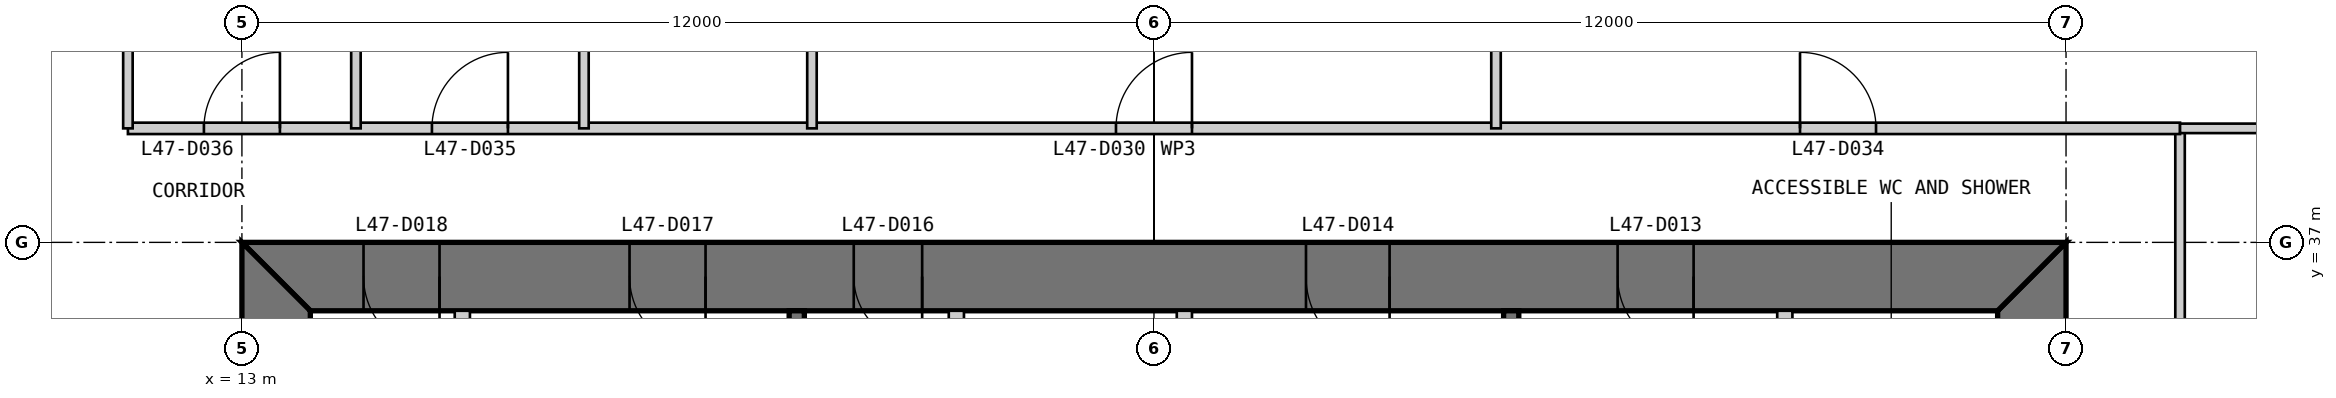
"""IFC4 building model, lengths in metres.
Left out: names, types, materials, properties, quantities, classifications, styles, units other than length and angle.
Written with IfcOpenShell. Run it as: python <this file> out.ifc"""

import sys

from ifc_helpers import new_model, si_unit, direction, frame, frame_2d, origin, place, context, subcontext, project, spatial, polyline, rectangle, outline, extrude, element, fill, save


model = new_model("IFC4")
c1 = context("Model", 3, precision=1e-05, world=origin(), true_north=direction((0.0, 1.0)))
c2 = subcontext(c1, "Body", "Model", "MODEL_VIEW")
j1 = project(units=[si_unit("LENGTHUNIT", "METRE"), si_unit("PLANEANGLEUNIT", "RADIAN")], contexts=[c1])
p1 = place(None, origin())
s1 = spatial("IfcSite", under=j1, at=p1, CompositionType="ELEMENT")
p2 = place(p1, origin())
s2 = spatial("IfcBuilding", under=s1, at=p2, CompositionType="ELEMENT")
p3 = place(p2, frame((0.0, 0.0, 201.8)))
s3 = spatial("IfcBuildingStorey", under=s2, at=p3, CompositionType="ELEMENT", Elevation=201.8)
p4 = place(p3, frame((36.55, 13.9, 0.0), z_axis=(0.0, 0.0, 1.0), x_axis=(0.0, 1.0, 0.0)))
e1 = element("IfcWall", 1, at=p4, inside=s3, PredefinedType="SHEAR", context=c2, shape_type="SweptSolid", body=[
    extrude(outline(polyline([(-0.9, -0.45), (23.1, -0.45), (22.2, 0.45), (0.0, 0.45), (-0.9, -0.45)])), origin(), (0.0, 0.0, 1.0), 4.0),
])
p5 = place(p4, frame((20.2, 0.0, 0.0)))
e2 = element("IfcOpeningElement", 2, at=p5, cuts=e1, PredefinedType="OPENING", context=c2, shape_type="SweptSolid", body=[
    extrude(rectangle(XDim=1.0, YDim=2.2, at=frame_2d((0.5, 1.1))), frame((0.0, 0.46, 0.0), z_axis=(0.0, -1.0, 0.0), x_axis=(1.0, 0.0, 0.0)), (0.0, 0.0, 1.0), 0.92),
])
p6 = place(p4, frame((17.25, 0.0, 0.0)))
e3 = element("IfcOpeningElement", 3, at=p6, cuts=e1, PredefinedType="OPENING", context=c2, shape_type="SweptSolid", body=[
    extrude(rectangle(XDim=0.9, YDim=2.2, at=frame_2d((0.45, 1.1))), frame((0.0, 0.46, 0.0), z_axis=(0.0, -1.0, 0.0), x_axis=(1.0, 0.0, 0.0)), (0.0, 0.0, 1.0), 0.92),
])
p7 = place(p3, frame((37.0, 36.55, 0.0), z_axis=(0.0, 0.0, 1.0), x_axis=(-1.0, 0.0, 0.0)))
e4 = element("IfcWall", 4, at=p7, inside=s3, PredefinedType="SHEAR", context=c2, shape_type="SweptSolid", body=[
    extrude(outline(polyline([(0.0, -0.45), (24.0, -0.45), (23.1, 0.45), (0.9, 0.45), (0.0, -0.45)])), origin(), (0.0, 0.0, 1.0), 4.0),
])
p8 = place(p7, frame((4.9, 0.0, 0.0)))
e5 = element("IfcOpeningElement", 5, at=p8, cuts=e4, PredefinedType="OPENING", context=c2, shape_type="SweptSolid", body=[
    extrude(rectangle(XDim=1.0, YDim=2.2, at=frame_2d((0.5, 1.1))), frame((0.0, 0.46, 0.0), z_axis=(0.0, -1.0, 0.0), x_axis=(1.0, 0.0, 0.0)), (0.0, 0.0, 1.0), 0.92),
])
p9 = place(p7, frame((8.9, 0.0, 0.0)))
e6 = element("IfcOpeningElement", 6, at=p9, cuts=e4, PredefinedType="OPENING", context=c2, shape_type="SweptSolid", body=[
    extrude(rectangle(XDim=1.1, YDim=2.2, at=frame_2d((0.55, 1.1))), frame((0.0, 0.46, 0.0), z_axis=(0.0, -1.0, 0.0), x_axis=(1.0, 0.0, 0.0)), (0.0, 0.0, 1.0), 0.92),
])
p10 = place(p7, frame((15.05, 0.0, 0.0)))
e7 = element("IfcOpeningElement", 7, at=p10, cuts=e4, PredefinedType="OPENING", context=c2, shape_type="SweptSolid", body=[
    extrude(rectangle(XDim=0.9, YDim=2.2, at=frame_2d((0.45, 1.1))), frame((0.0, 0.46, 0.0), z_axis=(0.0, -1.0, 0.0), x_axis=(1.0, 0.0, 0.0)), (0.0, 0.0, 1.0), 0.92),
])
p11 = place(p7, frame((17.9, 0.0, 0.0)))
e8 = element("IfcOpeningElement", 8, at=p11, cuts=e4, PredefinedType="OPENING", context=c2, shape_type="SweptSolid", body=[
    extrude(rectangle(XDim=1.0, YDim=2.2, at=frame_2d((0.5, 1.1))), frame((0.0, 0.46, 0.0), z_axis=(0.0, -1.0, 0.0), x_axis=(1.0, 0.0, 0.0)), (0.0, 0.0, 1.0), 0.92),
])
p12 = place(p7, frame((21.4, 0.0, 0.0)))
e9 = element("IfcOpeningElement", 9, at=p12, cuts=e4, PredefinedType="OPENING", context=c2, shape_type="SweptSolid", body=[
    extrude(rectangle(XDim=1.0, YDim=2.2, at=frame_2d((0.5, 1.1))), frame((0.0, 0.46, 0.0), z_axis=(0.0, -1.0, 0.0), x_axis=(1.0, 0.0, 0.0)), (0.0, 0.0, 1.0), 0.92),
])
p13 = place(p3, frame((13.45, 36.1, 0.0), z_axis=(0.0, 0.0, 1.0), x_axis=(0.0, -1.0, 0.0)))
e10 = element("IfcWall", 10, at=p13, inside=s3, PredefinedType="SHEAR", context=c2, shape_type="SweptSolid", body=[
    extrude(outline(polyline([(-0.9, -0.45), (23.1, -0.45), (22.2, 0.45), (0.0, 0.45), (-0.9, -0.45)])), origin(), (0.0, 0.0, 1.0), 4.0),
])
p14 = place(p13, frame((20.2, 0.0, 0.0)))
e11 = element("IfcOpeningElement", 11, at=p14, cuts=e10, PredefinedType="OPENING", context=c2, shape_type="SweptSolid", body=[
    extrude(rectangle(XDim=1.0, YDim=2.2, at=frame_2d((0.5, 1.1))), frame((0.0, 0.46, 0.0), z_axis=(0.0, -1.0, 0.0), x_axis=(1.0, 0.0, 0.0)), (0.0, 0.0, 1.0), 0.92),
])
p15 = place(p13, frame((17.25, 0.0, 0.0)))
e12 = element("IfcOpeningElement", 12, at=p15, cuts=e10, PredefinedType="OPENING", context=c2, shape_type="SweptSolid", body=[
    extrude(rectangle(XDim=0.9, YDim=2.2, at=frame_2d((0.45, 1.1))), frame((0.0, 0.46, 0.0), z_axis=(0.0, -1.0, 0.0), x_axis=(1.0, 0.0, 0.0)), (0.0, 0.0, 1.0), 0.92),
])
p16 = place(p3, frame((33.3, 36.1, 0.0), z_axis=(0.0, 0.0, 1.0), x_axis=(0.0, -1.0, 0.0)))
e13 = element("IfcWall", 13, at=p16, inside=s3, PredefinedType="PARTITIONING", context=c2, shape_type="SweptSolid", body=[
    extrude(rectangle(XDim=16.1, YDim=0.2, at=frame_2d((8.05, 0.0))), origin(), (0.0, 0.0, 1.0), 3.8),
])
p17 = place(p3, frame((29.7, 36.1, 0.0), z_axis=(0.0, 0.0, 1.0), x_axis=(0.0, -1.0, 0.0)))
e14 = element("IfcWall", 14, at=p17, inside=s3, PredefinedType="SOLIDWALL", context=c2, shape_type="SweptSolid", body=[
    extrude(rectangle(XDim=16.1, YDim=0.2, at=frame_2d((8.05, 0.0))), origin(), (0.0, 0.0, 1.0), 3.8),
])
p18 = place(p17, frame((7.217, 0.0, 0.0)))
e15 = element("IfcOpeningElement", 15, at=p18, cuts=e14, PredefinedType="OPENING", context=c2, shape_type="SweptSolid", body=[
    extrude(rectangle(XDim=1.1, YDim=2.2, at=frame_2d((0.55, 1.1))), frame((0.0, 0.11, 0.0), z_axis=(0.0, -1.0, 0.0), x_axis=(1.0, 0.0, 0.0)), (0.0, 0.0, 1.0), 0.22),
])
p19 = place(p17, frame((10.55, 0.0, 0.0)))
e16 = element("IfcOpeningElement", 16, at=p19, cuts=e14, PredefinedType="OPENING", context=c2, shape_type="SweptSolid", body=[
    extrude(rectangle(XDim=1.1, YDim=2.2, at=frame_2d((0.55, 1.1))), frame((0.0, 0.11, 0.0), z_axis=(0.0, -1.0, 0.0), x_axis=(1.0, 0.0, 0.0)), (0.0, 0.0, 1.0), 0.22),
])
p20 = place(p17, frame((13.883, 0.0, 0.0)))
e17 = element("IfcOpeningElement", 17, at=p20, cuts=e14, PredefinedType="OPENING", context=c2, shape_type="SweptSolid", body=[
    extrude(rectangle(XDim=1.1, YDim=2.2, at=frame_2d((0.55, 1.1))), frame((0.0, 0.11, 0.0), z_axis=(0.0, -1.0, 0.0), x_axis=(1.0, 0.0, 0.0)), (0.0, 0.0, 1.0), 0.22),
])
p21 = place(p3, frame((25.4, 36.1, 0.0), z_axis=(0.0, 0.0, 1.0), x_axis=(0.0, -1.0, 0.0)))
e18 = element("IfcWall", 18, at=p21, inside=s3, PredefinedType="PARTITIONING", context=c2, shape_type="SweptSolid", body=[
    extrude(rectangle(XDim=3.3, YDim=0.2, at=frame_2d((1.65, 0.0))), origin(), (0.0, 0.0, 1.0), 3.8),
])
p22 = place(p21, frame((0.9, 0.0, 0.0)))
e19 = element("IfcOpeningElement", 19, at=p22, cuts=e18, PredefinedType="OPENING", context=c2, shape_type="SweptSolid", body=[
    extrude(rectangle(XDim=1.1, YDim=2.2, at=frame_2d((0.55, 1.1))), frame((0.0, 0.11, 0.0), z_axis=(0.0, -1.0, 0.0), x_axis=(1.0, 0.0, 0.0)), (0.0, 0.0, 1.0), 0.22),
])
p23 = place(p3, frame((22.4, 36.1, 0.0), z_axis=(0.0, 0.0, 1.0), x_axis=(0.0, -1.0, 0.0)))
e20 = element("IfcWall", 20, at=p23, inside=s3, PredefinedType="PARTITIONING", context=c2, shape_type="SweptSolid", body=[
    extrude(rectangle(XDim=3.3, YDim=0.2, at=frame_2d((1.65, 0.0))), origin(), (0.0, 0.0, 1.0), 3.8),
])
p24 = place(p3, frame((20.3, 36.1, 0.0), z_axis=(0.0, 0.0, 1.0), x_axis=(0.0, -1.0, 0.0)))
e21 = element("IfcWall", 21, at=p24, inside=s3, PredefinedType="SOLIDWALL", context=c2, shape_type="SweptSolid", body=[
    extrude(rectangle(XDim=6.1, YDim=0.2, at=frame_2d((3.05, 0.0))), origin(), (0.0, 0.0, 1.0), 3.8),
])
p25 = place(p3, frame((15.9, 36.1, 0.0), z_axis=(0.0, 0.0, 1.0), x_axis=(0.0, -1.0, 0.0)))
e22 = element("IfcWall", 22, at=p25, inside=s3, PredefinedType="PARTITIONING", context=c2, shape_type="SweptSolid", body=[
    extrude(rectangle(XDim=6.1, YDim=0.2, at=frame_2d((3.05, 0.0))), origin(), (0.0, 0.0, 1.0), 3.8),
])
p26 = place(p3, frame((38.5, 35.5, 0.0), z_axis=(0.0, 0.0, 1.0), x_axis=(0.0, 1.0, 0.0)))
e23 = element("IfcWall", 23, at=p26, inside=s3, PredefinedType="PARTITIONING", context=c2, shape_type="SweptSolid", body=[
    extrude(rectangle(XDim=3.0, YDim=0.125, at=frame_2d((1.5, 0.0))), origin(), (0.0, 0.0, 1.0), 3.85),
])
p27 = place(p3, frame((38.5, 38.5, 0.0), z_axis=(0.0, 0.0, 1.0), x_axis=(-1.0, 0.0, 0.0)))
e24 = element("IfcWall", 24, at=p27, inside=s3, PredefinedType="PARTITIONING", context=c2, shape_type="SweptSolid", body=[
    extrude(rectangle(XDim=27.0, YDim=0.15, at=frame_2d((13.5, 0.0))), origin(), (0.0, 0.0, 1.0), 3.85),
])
p28 = place(p27, frame((13.0, 0.0, 0.0)))
e25 = element("IfcOpeningElement", 25, at=p28, cuts=e24, PredefinedType="OPENING", context=c2, shape_type="SweptSolid", body=[
    extrude(rectangle(XDim=1.0, YDim=2.2, at=frame_2d((0.5, 1.1))), frame((0.0, 0.085, 0.0), z_axis=(0.0, -1.0, 0.0), x_axis=(1.0, 0.0, 0.0)), (0.0, 0.0, 1.0), 0.17),
])
p29 = place(p27, frame((4.0, 0.0, 0.0)))
e26 = element("IfcOpeningElement", 26, at=p29, cuts=e24, PredefinedType="OPENING", context=c2, shape_type="SweptSolid", body=[
    extrude(rectangle(XDim=1.0, YDim=2.2, at=frame_2d((0.5, 1.1))), frame((0.0, 0.085, 0.0), z_axis=(0.0, -1.0, 0.0), x_axis=(1.0, 0.0, 0.0)), (0.0, 0.0, 1.0), 0.17),
])
p30 = place(p27, frame((22.0, 0.0, 0.0)))
e27 = element("IfcOpeningElement", 27, at=p30, cuts=e24, PredefinedType="OPENING", context=c2, shape_type="SweptSolid", body=[
    extrude(rectangle(XDim=1.0, YDim=2.2, at=frame_2d((0.5, 1.1))), frame((0.0, 0.085, 0.0), z_axis=(0.0, -1.0, 0.0), x_axis=(1.0, 0.0, 0.0)), (0.0, 0.0, 1.0), 0.17),
])
p31 = place(p27, frame((25.0, 0.0, 0.0)))
e28 = element("IfcOpeningElement", 28, at=p31, cuts=e24, PredefinedType="OPENING", context=c2, shape_type="SweptSolid", body=[
    extrude(rectangle(XDim=1.0, YDim=2.2, at=frame_2d((0.5, 1.1))), frame((0.0, 0.085, 0.0), z_axis=(0.0, -1.0, 0.0), x_axis=(1.0, 0.0, 0.0)), (0.0, 0.0, 1.0), 0.17),
])
for number, where, z_axis, x_axis in (
    (29, (49.85, 38.5, 0.0), (0.0, 0.0, 1.0), (-1.0, 0.0, 0.0)),
    (30, (29.5, 49.85, 0.0), (0.0, 0.0, 1.0), (0.0, -1.0, 0.0)),
):
    element("IfcWall", number, at=place(p3, frame(where, z_axis=z_axis, x_axis=x_axis)), inside=s3, PredefinedType="PARTITIONING", context=c2, shape_type="SweptSolid", body=[
        extrude(rectangle(XDim=11.35, YDim=0.125, at=frame_2d((5.675, 0.0))), origin(), (0.0, 0.0, 1.0), 3.85),
    ])
p32 = place(p3, frame((20.5, 46.0, 0.0), z_axis=(0.0, 0.0, 1.0), x_axis=(0.0, -1.0, 0.0)))
e31 = element("IfcWall", 31, at=p32, inside=s3, PredefinedType="PARTITIONING", context=c2, shape_type="SweptSolid", body=[
    extrude(rectangle(XDim=7.5, YDim=0.125, at=frame_2d((3.75, 0.0))), origin(), (0.0, 0.0, 1.0), 3.85),
])
p33 = place(p32, frame((3.3, 0.0, 0.0)))
e32 = element("IfcOpeningElement", 32, at=p33, cuts=e31, PredefinedType="OPENING", context=c2, shape_type="SweptSolid", body=[
    extrude(rectangle(XDim=0.9, YDim=2.2, at=frame_2d((0.45, 1.1))), frame((0.0, 0.073, 0.0), z_axis=(0.0, -1.0, 0.0), x_axis=(1.0, 0.0, 0.0)), (0.0, 0.0, 1.0), 0.145),
])
p34 = place(p3, frame((17.5, 49.85, 0.0), z_axis=(0.0, 0.0, 1.0), x_axis=(0.0, -1.0, 0.0)))
e33 = element("IfcWall", 33, at=p34, inside=s3, PredefinedType="PARTITIONING", context=c2, shape_type="SweptSolid", body=[
    extrude(rectangle(XDim=11.35, YDim=0.125, at=frame_2d((5.675, 0.0))), origin(), (0.0, 0.0, 1.0), 3.85),
])
p35 = place(p3, frame((14.5, 46.0, 0.0), z_axis=(0.0, 0.0, 1.0), x_axis=(0.0, -1.0, 0.0)))
e34 = element("IfcWall", 34, at=p35, inside=s3, PredefinedType="PARTITIONING", context=c2, shape_type="SweptSolid", body=[
    extrude(rectangle(XDim=7.5, YDim=0.125, at=frame_2d((3.75, 0.0))), origin(), (0.0, 0.0, 1.0), 3.85),
])
p36 = place(p3, frame((11.5, 49.85, 0.0), z_axis=(0.0, 0.0, 1.0), x_axis=(0.0, -1.0, 0.0)))
e35 = element("IfcWall", 35, at=p36, inside=s3, PredefinedType="PARTITIONING", context=c2, shape_type="SweptSolid", body=[
    extrude(rectangle(XDim=11.35, YDim=0.125, at=frame_2d((5.675, 0.0))), origin(), (0.0, 0.0, 1.0), 3.85),
])
p37 = place(p8, origin())
e36 = element("IfcDoor", 36, at=p37, inside=s3, OperationType="SINGLE_SWING_LEFT", PredefinedType="DOOR", context=c2, shape_type="SweptSolid", body=[
    extrude(rectangle(XDim=1.0, YDim=2.2, at=frame_2d((0.5, 1.1))), frame((0.0, 0.025, 0.0), z_axis=(0.0, -1.0, 0.0), x_axis=(1.0, 0.0, 0.0)), (0.0, 0.0, 1.0), 0.05),
    extrude(outline(polyline([(0.0, 0.0), (0.04, 0.0), (0.04, 2.16), (0.96, 2.16), (0.96, 0.0), (1.0, 0.0), (1.0, 2.2), (0.0, 2.2), (0.0, 0.0)])), frame((0.0, 0.3, 0.0), z_axis=(0.0, -1.0, 0.0), x_axis=(1.0, 0.0, 0.0)), (0.0, 0.0, 1.0), 0.6),
])
fill(e5, e36)
p38 = place(p9, origin())
e37 = element("IfcDoor", 37, at=p38, inside=s3, OperationType="SINGLE_SWING_LEFT", PredefinedType="DOOR", context=c2, shape_type="SweptSolid", body=[
    extrude(rectangle(XDim=1.1, YDim=2.2, at=frame_2d((0.55, 1.1))), frame((0.0, 0.025, 0.0), z_axis=(0.0, -1.0, 0.0), x_axis=(1.0, 0.0, 0.0)), (0.0, 0.0, 1.0), 0.05),
    extrude(outline(polyline([(0.0, 0.0), (0.04, 0.0), (0.04, 2.16), (1.06, 2.16), (1.06, 0.0), (1.1, 0.0), (1.1, 2.2), (0.0, 2.2), (0.0, 0.0)])), frame((0.0, 0.3, 0.0), z_axis=(0.0, -1.0, 0.0), x_axis=(1.0, 0.0, 0.0)), (0.0, 0.0, 1.0), 0.6),
])
fill(e6, e37)
p39 = place(p10, origin())
e38 = element("IfcDoor", 38, at=p39, inside=s3, OperationType="SINGLE_SWING_LEFT", PredefinedType="DOOR", context=c2, shape_type="SweptSolid", body=[
    extrude(rectangle(XDim=0.9, YDim=2.2, at=frame_2d((0.45, 1.1))), frame((0.0, 0.025, 0.0), z_axis=(0.0, -1.0, 0.0), x_axis=(1.0, 0.0, 0.0)), (0.0, 0.0, 1.0), 0.05),
    extrude(outline(polyline([(0.0, 0.0), (0.04, 0.0), (0.04, 2.16), (0.86, 2.16), (0.86, 0.0), (0.9, 0.0), (0.9, 2.2), (0.0, 2.2), (0.0, 0.0)])), frame((0.0, 0.3, 0.0), z_axis=(0.0, -1.0, 0.0), x_axis=(1.0, 0.0, 0.0)), (0.0, 0.0, 1.0), 0.6),
])
fill(e7, e38)
p40 = place(p11, origin())
e39 = element("IfcDoor", 39, at=p40, inside=s3, OperationType="SINGLE_SWING_LEFT", PredefinedType="DOOR", context=c2, shape_type="SweptSolid", body=[
    extrude(rectangle(XDim=1.0, YDim=2.2, at=frame_2d((0.5, 1.1))), frame((0.0, 0.025, 0.0), z_axis=(0.0, -1.0, 0.0), x_axis=(1.0, 0.0, 0.0)), (0.0, 0.0, 1.0), 0.05),
    extrude(outline(polyline([(0.0, 0.0), (0.04, 0.0), (0.04, 2.16), (0.96, 2.16), (0.96, 0.0), (1.0, 0.0), (1.0, 2.2), (0.0, 2.2), (0.0, 0.0)])), frame((0.0, 0.3, 0.0), z_axis=(0.0, -1.0, 0.0), x_axis=(1.0, 0.0, 0.0)), (0.0, 0.0, 1.0), 0.6),
])
fill(e8, e39)
p41 = place(p12, origin())
e40 = element("IfcDoor", 40, at=p41, inside=s3, OperationType="SINGLE_SWING_LEFT", PredefinedType="DOOR", context=c2, shape_type="SweptSolid", body=[
    extrude(rectangle(XDim=1.0, YDim=2.2, at=frame_2d((0.5, 1.1))), frame((0.0, 0.025, 0.0), z_axis=(0.0, -1.0, 0.0), x_axis=(1.0, 0.0, 0.0)), (0.0, 0.0, 1.0), 0.05),
    extrude(outline(polyline([(0.0, 0.0), (0.04, 0.0), (0.04, 2.16), (0.96, 2.16), (0.96, 0.0), (1.0, 0.0), (1.0, 2.2), (0.0, 2.2), (0.0, 0.0)])), frame((0.0, 0.3, 0.0), z_axis=(0.0, -1.0, 0.0), x_axis=(1.0, 0.0, 0.0)), (0.0, 0.0, 1.0), 0.6),
])
fill(e9, e40)
p42 = place(p28, frame((1.0, 0.0, 0.0), z_axis=(0.0, 0.0, 1.0), x_axis=(-1.0, 0.0, 0.0)))
e41 = element("IfcDoor", 41, at=p42, inside=s3, OperationType="SINGLE_SWING_RIGHT", PredefinedType="DOOR", context=c2, shape_type="SweptSolid", body=[
    extrude(rectangle(XDim=1.0, YDim=2.2, at=frame_2d((0.5, 1.1))), frame((0.0, 0.025, 0.0), z_axis=(0.0, -1.0, 0.0), x_axis=(1.0, 0.0, 0.0)), (0.0, 0.0, 1.0), 0.05),
])
fill(e25, e41)
p43 = place(p29, frame((1.0, 0.0, 0.0), z_axis=(0.0, 0.0, 1.0), x_axis=(-1.0, 0.0, 0.0)))
e42 = element("IfcDoor", 42, at=p43, inside=s3, OperationType="SINGLE_SWING_LEFT", PredefinedType="DOOR", context=c2, shape_type="SweptSolid", body=[
    extrude(rectangle(XDim=1.0, YDim=2.2, at=frame_2d((0.5, 1.1))), frame((0.0, 0.025, 0.0), z_axis=(0.0, -1.0, 0.0), x_axis=(1.0, 0.0, 0.0)), (0.0, 0.0, 1.0), 0.05),
])
fill(e26, e42)
p44 = place(p30, frame((1.0, 0.0, 0.0), z_axis=(0.0, 0.0, 1.0), x_axis=(-1.0, 0.0, 0.0)))
e43 = element("IfcDoor", 43, at=p44, inside=s3, OperationType="SINGLE_SWING_RIGHT", PredefinedType="DOOR", context=c2, shape_type="SweptSolid", body=[
    extrude(rectangle(XDim=1.0, YDim=2.2, at=frame_2d((0.5, 1.1))), frame((0.0, 0.025, 0.0), z_axis=(0.0, -1.0, 0.0), x_axis=(1.0, 0.0, 0.0)), (0.0, 0.0, 1.0), 0.05),
])
fill(e27, e43)
p45 = place(p31, frame((1.0, 0.0, 0.0), z_axis=(0.0, 0.0, 1.0), x_axis=(-1.0, 0.0, 0.0)))
e44 = element("IfcDoor", 44, at=p45, inside=s3, OperationType="SINGLE_SWING_RIGHT", PredefinedType="DOOR", context=c2, shape_type="SweptSolid", body=[
    extrude(rectangle(XDim=1.0, YDim=2.2, at=frame_2d((0.5, 1.1))), frame((0.0, 0.025, 0.0), z_axis=(0.0, -1.0, 0.0), x_axis=(1.0, 0.0, 0.0)), (0.0, 0.0, 1.0), 0.05),
])
fill(e28, e44)
save(model, sys.argv[1])
